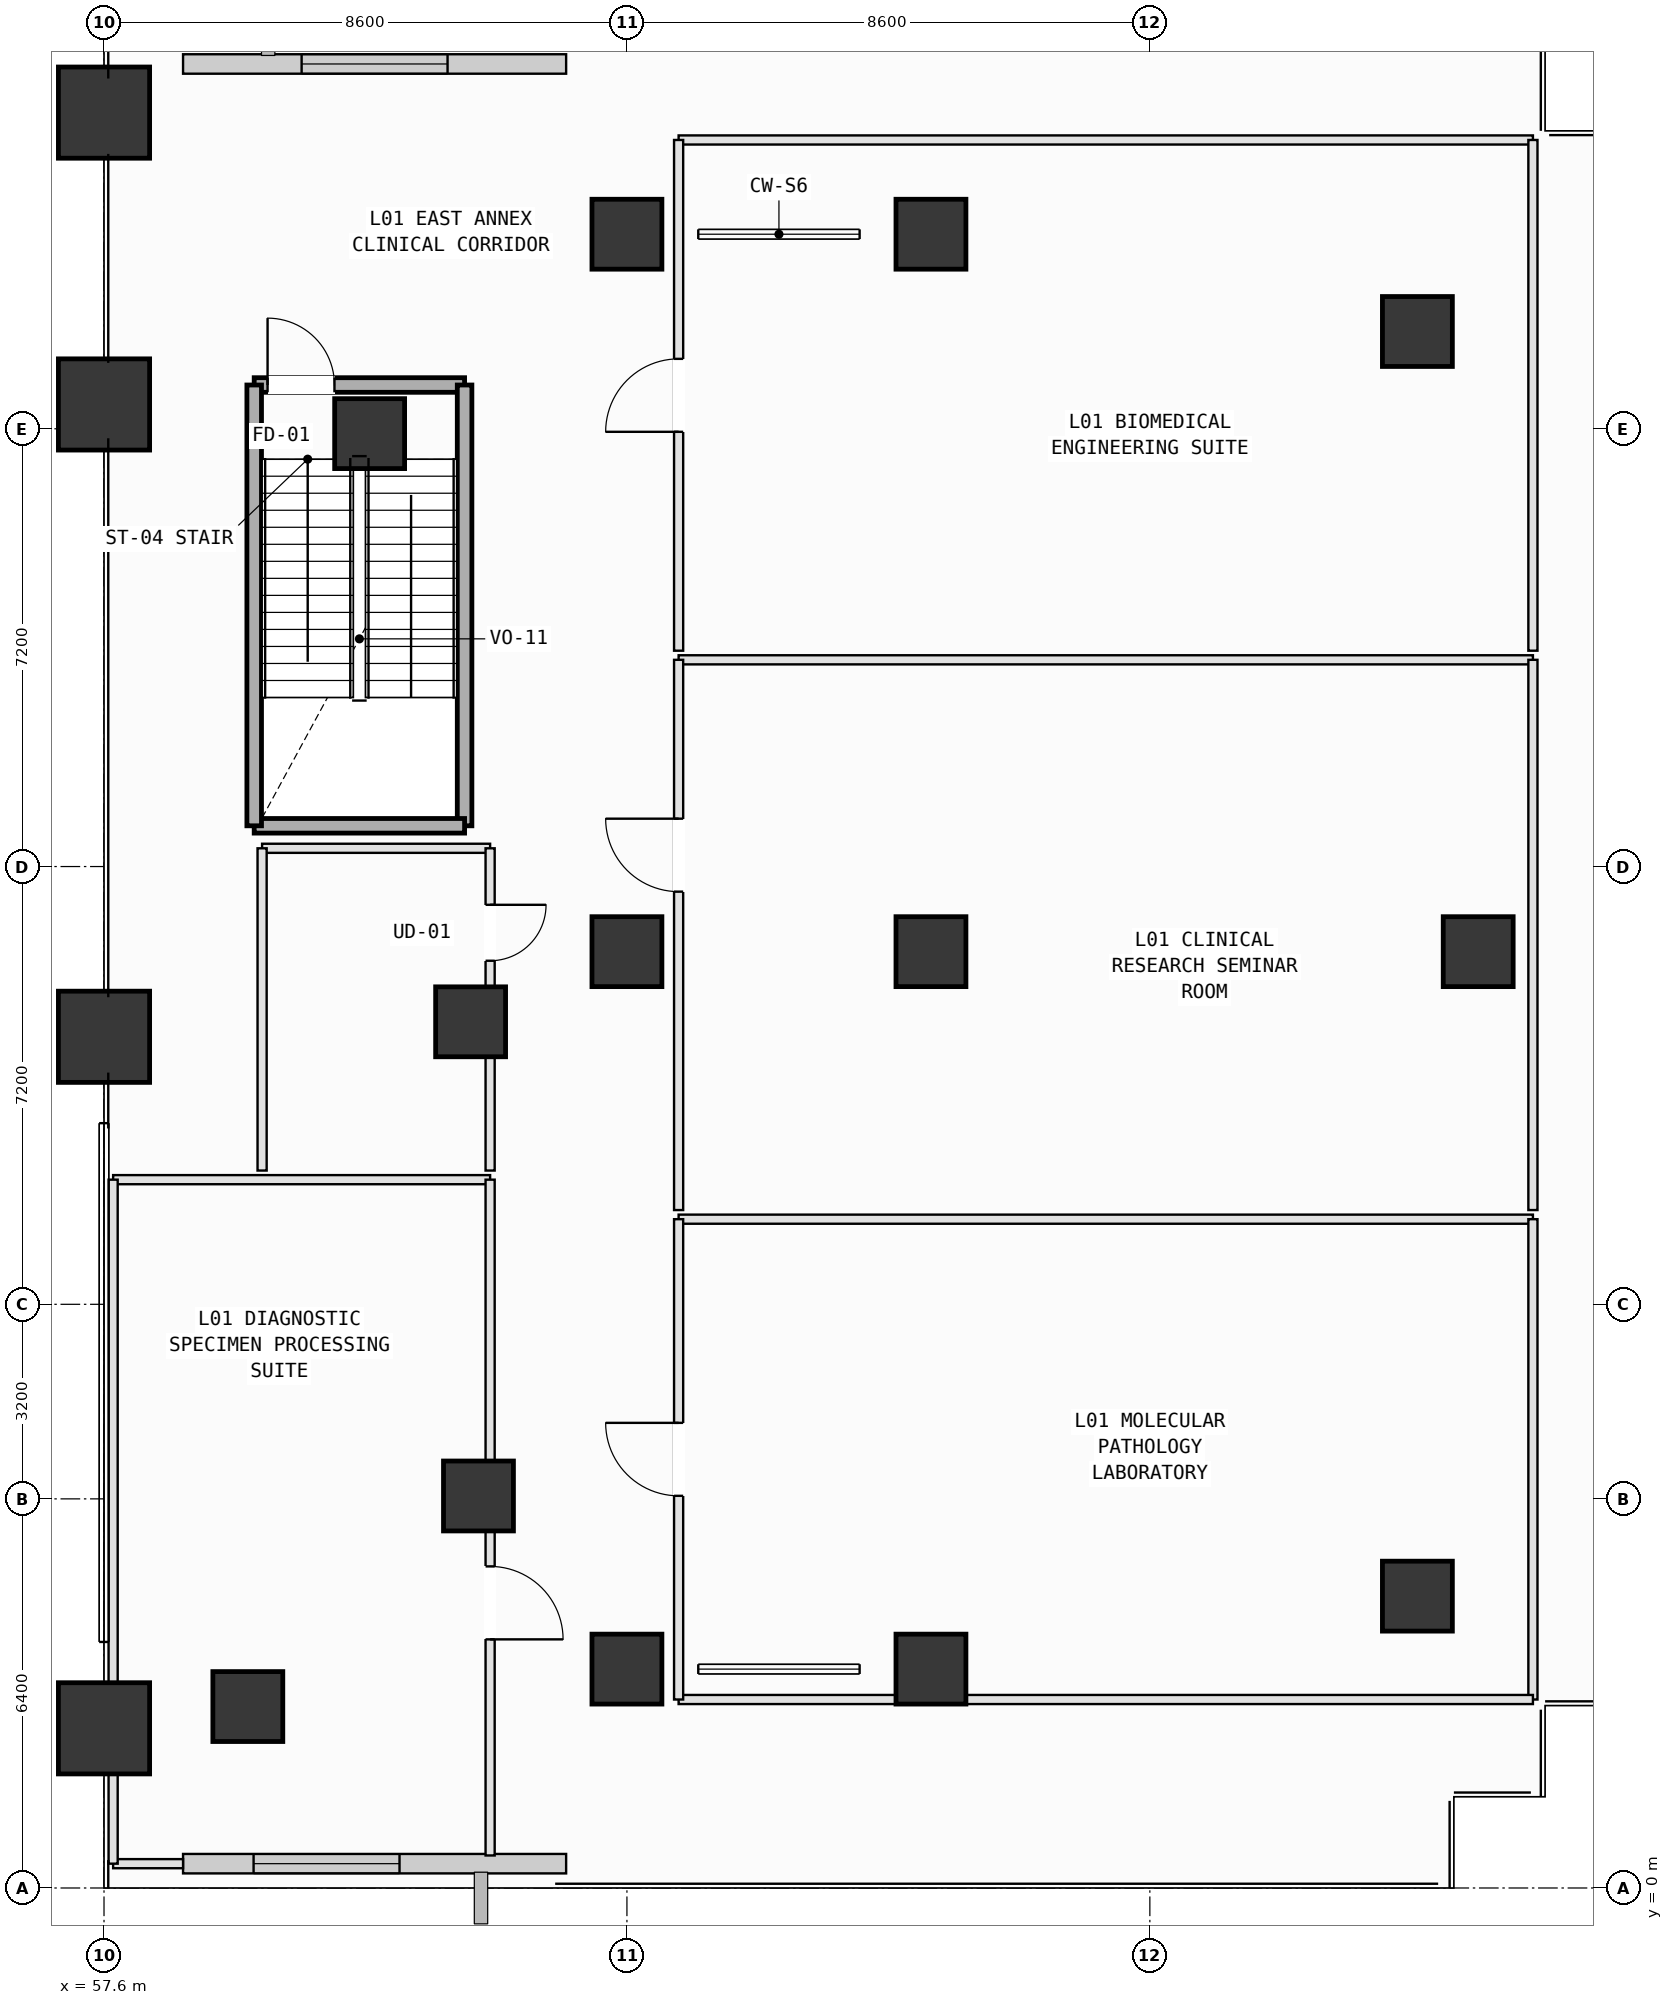
"""IFC4 building model, lengths in metres.
Left out: names, types, materials, properties, quantities, classifications, styles, units other than length and angle.
Written with IfcOpenShell. Run it as: python <this file> out.ifc"""

import sys

from ifc_helpers import new_model, si_unit, direction, frame, frame_2d, origin, origin_2d, place, context, subcontext, project, spatial, rectangle, extrude, element, fill, save


model = new_model("IFC4")
c1 = context("Model", 3, precision=1e-05, world=origin(), true_north=direction((0.0, 1.0)))
c2 = subcontext(c1, "Body", "Model", "MODEL_VIEW")
j1 = project(units=[si_unit("LENGTHUNIT", "METRE"), si_unit("PLANEANGLEUNIT", "RADIAN")], contexts=[c1])
p1 = place(None, origin())
s1 = spatial("IfcSite", under=j1, at=p1, CompositionType="ELEMENT")
p2 = place(p1, origin())
s2 = spatial("IfcBuilding", under=s1, at=p2, CompositionType="ELEMENT")
p3 = place(p2, frame((0.0, 0.0, 5.4)))
s3 = spatial("IfcBuildingStorey", under=s2, at=p3, CompositionType="ELEMENT", Elevation=5.4)
for number, where, z_axis, x_axis in (
    (1, (57.6, 2.626, 0.0), (0.0, 0.0, 1.0), (1.0, 0.0, 0.0)),
    (2, (57.6, 14.0, 0.0), (0.0, 0.0, 1.0), (1.0, 0.0, 0.0)),
    (3, (57.6, 24.4, 0.0), (0.0, 0.0, 1.0), (1.0, 0.0, 0.0)),
    (4, (57.6, 29.2, 0.0), (0.0, 0.0, 1.0), (1.0, 0.0, 0.0)),
):
    element("IfcColumn", number, at=place(p3, frame(where, z_axis=z_axis, x_axis=x_axis)), inside=s3, PredefinedType="PILASTER", context=c2, shape_type="SweptSolid", body=[
        extrude(rectangle(XDim=1.5, YDim=1.5, at=origin_2d()), origin(), (0.0, 0.0, 1.0), 5.4),
    ])
for number, where, z_axis, x_axis in (
    (5, (59.965, 2.984, 0.0), (0.0, 0.0, 1.0), (1.0, 0.0, 0.0)),
    (6, (63.758, 6.448, 0.0), (0.0, 0.0, 1.0), (1.0, 0.0, 0.0)),
    (7, (63.629, 14.246, 0.0), (0.0, 0.0, 1.0), (1.0, 0.0, 0.0)),
    (8, (61.969, 23.92, 0.0), (0.0, 0.0, 1.0), (1.0, 0.0, 0.0)),
    (9, (66.2, 3.6, 0.0), (0.0, 0.0, 1.0), (1.0, 0.0, 0.0)),
    (10, (71.2, 3.6, 0.0), (0.0, 0.0, 1.0), (1.0, 0.0, 0.0)),
    (11, (66.2, 15.4, 0.0), (0.0, 0.0, 1.0), (1.0, 0.0, 0.0)),
    (12, (71.2, 15.4, 0.0), (0.0, 0.0, 1.0), (1.0, 0.0, 0.0)),
    (13, (66.2, 27.2, 0.0), (0.0, 0.0, 1.0), (1.0, 0.0, 0.0)),
    (14, (71.2, 27.2, 0.0), (0.0, 0.0, 1.0), (1.0, 0.0, 0.0)),
    (15, (79.2, 4.8, 0.0), (0.0, 0.0, 1.0), (1.0, 0.0, 0.0)),
    (16, (80.2, 15.4, 0.0), (0.0, 0.0, 1.0), (1.0, 0.0, 0.0)),
    (17, (79.2, 25.6, 0.0), (0.0, 0.0, 1.0), (1.0, 0.0, 0.0)),
):
    element("IfcColumn", number, at=place(p3, frame(where, z_axis=z_axis, x_axis=x_axis)), inside=s3, PredefinedType="COLUMN", context=c2, shape_type="SweptSolid", body=[
        extrude(rectangle(XDim=1.15, YDim=1.15, at=origin_2d()), origin(), (0.0, 0.0, 1.0), 5.4),
    ])
p4 = place(p3, frame((65.2, 0.4, 0.0), z_axis=(0.0, 0.0, 1.0), x_axis=(-1.0, 0.0, 0.0)))
e18 = element("IfcWall", 18, at=p4, inside=s3, PredefinedType="SOLIDWALL", context=c2, shape_type="SweptSolid", body=[
    extrude(rectangle(XDim=6.3, YDim=0.32, at=frame_2d((3.15, 0.0))), origin(), (0.0, 0.0, 1.0), 4.23),
])
p5 = place(p4, frame((2.74, 0.0, 0.8)))
e19 = element("IfcOpeningElement", 19, at=p5, cuts=e18, PredefinedType="OPENING", context=c2, shape_type="SweptSolid", body=[
    extrude(rectangle(XDim=2.4, YDim=2.2, at=frame_2d((1.2, 1.1))), frame((0.0, 0.17, 0.0), z_axis=(0.0, -1.0, 0.0), x_axis=(1.0, 0.0, 0.0)), (0.0, 0.0, 1.0), 0.34),
])
p6 = place(p3, frame((58.9, 30.0, 0.0), z_axis=(0.0, 0.0, 1.0), x_axis=(1.0, 0.0, 0.0)))
e20 = element("IfcWall", 20, at=p6, inside=s3, PredefinedType="SOLIDWALL", context=c2, shape_type="SweptSolid", body=[
    extrude(rectangle(XDim=6.3, YDim=0.32, at=frame_2d((3.15, 0.0))), origin(), (0.0, 0.0, 1.0), 4.23),
])
p7 = place(p6, frame((1.95, 0.0, 0.8)))
e21 = element("IfcOpeningElement", 21, at=p7, cuts=e20, PredefinedType="OPENING", context=c2, shape_type="SweptSolid", body=[
    extrude(rectangle(XDim=2.4, YDim=2.2, at=frame_2d((1.2, 1.1))), frame((0.0, 0.17, 0.0), z_axis=(0.0, -1.0, 0.0), x_axis=(1.0, 0.0, 0.0)), (0.0, 0.0, 1.0), 0.34),
])
p8 = place(p3, frame((60.07, 24.72, 0.0), z_axis=(0.0, 0.0, 1.0), x_axis=(1.0, 0.0, 0.0)))
e22 = element("IfcWall", 22, at=p8, inside=s3, PredefinedType="SOLIDWALL", context=c2, shape_type="SweptSolid", body=[
    extrude(rectangle(XDim=3.46, YDim=0.24, at=frame_2d((1.73, 0.0))), origin(), (0.0, 0.0, 1.0), 5.15),
])
p9 = place(p8, frame((0.22, 0.0, 0.0)))
e23 = element("IfcOpeningElement", 23, at=p9, cuts=e22, PredefinedType="OPENING", context=c2, shape_type="SweptSolid", body=[
    extrude(rectangle(XDim=1.1, YDim=2.15, at=frame_2d((0.55, 1.075))), frame((0.0, 0.13, 0.0), z_axis=(0.0, -1.0, 0.0), x_axis=(1.0, 0.0, 0.0)), (0.0, 0.0, 1.0), 0.26),
])
p10 = place(p3, frame((63.53, 24.72, 0.0), z_axis=(0.0, 0.0, 1.0), x_axis=(0.0, -1.0, 0.0)))
e24 = element("IfcWall", 24, at=p10, inside=s3, PredefinedType="SOLIDWALL", context=c2, shape_type="SweptSolid", body=[
    extrude(rectangle(XDim=7.25, YDim=0.24, at=frame_2d((3.625, 0.0))), origin(), (0.0, 0.0, 1.0), 5.15),
])
p11 = place(p3, frame((63.53, 17.47, 0.0), z_axis=(0.0, 0.0, 1.0), x_axis=(-1.0, 0.0, 0.0)))
e25 = element("IfcWall", 25, at=p11, inside=s3, PredefinedType="SOLIDWALL", context=c2, shape_type="SweptSolid", body=[
    extrude(rectangle(XDim=3.46, YDim=0.24, at=frame_2d((1.73, 0.0))), origin(), (0.0, 0.0, 1.0), 5.15),
])
p12 = place(p3, frame((60.07, 17.47, 0.0), z_axis=(0.0, 0.0, 1.0), x_axis=(0.0, 1.0, 0.0)))
e26 = element("IfcWall", 26, at=p12, inside=s3, PredefinedType="SOLIDWALL", context=c2, shape_type="SweptSolid", body=[
    extrude(rectangle(XDim=7.25, YDim=0.24, at=frame_2d((3.625, 0.0))), origin(), (0.0, 0.0, 1.0), 5.15),
])
p13 = place(p3, frame((67.05, 11.0, 0.0), z_axis=(0.0, 0.0, 1.0), x_axis=(1.0, 0.0, 0.0)))
e27 = element("IfcWall", 27, at=p13, inside=s3, PredefinedType="PARTITIONING", context=c2, shape_type="SweptSolid", body=[
    extrude(rectangle(XDim=14.05, YDim=0.15, at=frame_2d((7.025, 0.0))), origin(), (0.0, 0.0, 1.0), 5.15),
])
p14 = place(p3, frame((81.1, 11.0, 0.0), z_axis=(0.0, 0.0, 1.0), x_axis=(0.0, -1.0, 0.0)))
e28 = element("IfcWall", 28, at=p14, inside=s3, PredefinedType="PARTITIONING", context=c2, shape_type="SweptSolid", body=[
    extrude(rectangle(XDim=7.9, YDim=0.15, at=frame_2d((3.95, 0.0))), origin(), (0.0, 0.0, 1.0), 5.15),
])
p15 = place(p3, frame((81.1, 3.1, 0.0), z_axis=(0.0, 0.0, 1.0), x_axis=(-1.0, 0.0, 0.0)))
e29 = element("IfcWall", 29, at=p15, inside=s3, PredefinedType="PARTITIONING", context=c2, shape_type="SweptSolid", body=[
    extrude(rectangle(XDim=14.05, YDim=0.15, at=frame_2d((7.025, 0.0))), origin(), (0.0, 0.0, 1.0), 4.235),
])
p16 = place(p3, frame((67.05, 3.1, 0.0), z_axis=(0.0, 0.0, 1.0), x_axis=(0.0, 1.0, 0.0)))
e30 = element("IfcWall", 30, at=p16, inside=s3, PredefinedType="PARTITIONING", context=c2, shape_type="SweptSolid", body=[
    extrude(rectangle(XDim=7.9, YDim=0.15, at=frame_2d((3.95, 0.0))), origin(), (0.0, 0.0, 1.0), 5.15),
])
p17 = place(p16, frame((3.35, 0.0, 0.0)))
e31 = element("IfcOpeningElement", 31, at=p17, cuts=e30, PredefinedType="OPENING", context=c2, shape_type="SweptSolid", body=[
    extrude(rectangle(XDim=1.2, YDim=2.15, at=frame_2d((0.6, 1.075))), frame((0.0, 0.085, 0.0), z_axis=(0.0, -1.0, 0.0), x_axis=(1.0, 0.0, 0.0)), (0.0, 0.0, 1.0), 0.17),
])
p18 = place(p3, frame((67.05, 20.2, 0.0), z_axis=(0.0, 0.0, 1.0), x_axis=(1.0, 0.0, 0.0)))
e32 = element("IfcWall", 32, at=p18, inside=s3, PredefinedType="PARTITIONING", context=c2, shape_type="SweptSolid", body=[
    extrude(rectangle(XDim=14.05, YDim=0.15, at=frame_2d((7.025, 0.0))), origin(), (0.0, 0.0, 1.0), 5.15),
])
p19 = place(p3, frame((81.1, 20.2, 0.0), z_axis=(0.0, 0.0, 1.0), x_axis=(0.0, -1.0, 0.0)))
e33 = element("IfcWall", 33, at=p19, inside=s3, PredefinedType="PARTITIONING", context=c2, shape_type="SweptSolid", body=[
    extrude(rectangle(XDim=9.05, YDim=0.15, at=frame_2d((4.525, 0.0))), origin(), (0.0, 0.0, 1.0), 5.15),
])
p20 = place(p3, frame((67.05, 11.15, 0.0), z_axis=(0.0, 0.0, 1.0), x_axis=(0.0, 1.0, 0.0)))
e34 = element("IfcWall", 34, at=p20, inside=s3, PredefinedType="PARTITIONING", context=c2, shape_type="SweptSolid", body=[
    extrude(rectangle(XDim=9.05, YDim=0.15, at=frame_2d((4.525, 0.0))), origin(), (0.0, 0.0, 1.0), 5.15),
])
p21 = place(p20, frame((5.237, 0.0, 0.0)))
e35 = element("IfcOpeningElement", 35, at=p21, cuts=e34, PredefinedType="OPENING", context=c2, shape_type="SweptSolid", body=[
    extrude(rectangle(XDim=1.2, YDim=2.15, at=frame_2d((0.6, 1.075))), frame((0.0, 0.085, 0.0), z_axis=(0.0, -1.0, 0.0), x_axis=(1.0, 0.0, 0.0)), (0.0, 0.0, 1.0), 0.17),
])
p22 = place(p3, frame((67.05, 28.75, 0.0), z_axis=(0.0, 0.0, 1.0), x_axis=(1.0, 0.0, 0.0)))
e36 = element("IfcWall", 36, at=p22, inside=s3, PredefinedType="PARTITIONING", context=c2, shape_type="SweptSolid", body=[
    extrude(rectangle(XDim=14.05, YDim=0.15, at=frame_2d((7.025, 0.0))), origin(), (0.0, 0.0, 1.0), 5.15),
])
p23 = place(p3, frame((81.1, 28.75, 0.0), z_axis=(0.0, 0.0, 1.0), x_axis=(0.0, -1.0, 0.0)))
e37 = element("IfcWall", 37, at=p23, inside=s3, PredefinedType="PARTITIONING", context=c2, shape_type="SweptSolid", body=[
    extrude(rectangle(XDim=8.4, YDim=0.15, at=frame_2d((4.2, 0.0))), origin(), (0.0, 0.0, 1.0), 5.15),
])
p24 = place(p3, frame((67.05, 20.35, 0.0), z_axis=(0.0, 0.0, 1.0), x_axis=(0.0, 1.0, 0.0)))
e38 = element("IfcWall", 38, at=p24, inside=s3, PredefinedType="PARTITIONING", context=c2, shape_type="SweptSolid", body=[
    extrude(rectangle(XDim=8.4, YDim=0.15, at=frame_2d((4.2, 0.0))), origin(), (0.0, 0.0, 1.0), 5.15),
])
p25 = place(p24, frame((3.6, 0.0, 0.0)))
e39 = element("IfcOpeningElement", 39, at=p25, cuts=e38, PredefinedType="OPENING", context=c2, shape_type="SweptSolid", body=[
    extrude(rectangle(XDim=1.2, YDim=2.15, at=frame_2d((0.6, 1.075))), frame((0.0, 0.085, 0.0), z_axis=(0.0, -1.0, 0.0), x_axis=(1.0, 0.0, 0.0)), (0.0, 0.0, 1.0), 0.17),
])
p26 = place(p3, frame((57.75, 11.65, 0.0), z_axis=(0.0, 0.0, 1.0), x_axis=(1.0, 0.0, 0.0)))
e40 = element("IfcWall", 40, at=p26, inside=s3, PredefinedType="PARTITIONING", context=c2, shape_type="SweptSolid", body=[
    extrude(rectangle(XDim=6.2, YDim=0.15, at=frame_2d((3.1, 0.0))), origin(), (0.0, 0.0, 1.0), 5.15),
])
p27 = place(p3, frame((63.95, 11.65, 0.0), z_axis=(0.0, 0.0, 1.0), x_axis=(0.0, -1.0, 0.0)))
e41 = element("IfcWall", 41, at=p27, inside=s3, PredefinedType="PARTITIONING", context=c2, shape_type="SweptSolid", body=[
    extrude(rectangle(XDim=11.115, YDim=0.15, at=frame_2d((5.558, 0.0))), origin(), (0.0, 0.0, 1.0), 4.235),
])
p28 = place(p27, frame((6.361, 0.0, 0.0)))
e42 = element("IfcOpeningElement", 42, at=p28, cuts=e41, PredefinedType="OPENING", context=c2, shape_type="SweptSolid", body=[
    extrude(rectangle(XDim=1.2, YDim=2.15, at=frame_2d((0.6, 1.075))), frame((0.0, 0.085, 0.0), z_axis=(0.0, -1.0, 0.0), x_axis=(1.0, 0.0, 0.0)), (0.0, 0.0, 1.0), 0.17),
])
p29 = place(p3, frame((58.9, 0.4, 0.0), z_axis=(0.0, 0.0, 1.0), x_axis=(-1.0, 0.0, 0.0)))
e43 = element("IfcWall", 43, at=p29, inside=s3, PredefinedType="PARTITIONING", context=c2, shape_type="SweptSolid", body=[
    extrude(rectangle(XDim=1.15, YDim=0.15, at=frame_2d((0.575, 0.0))), origin(), (0.0, 0.0, 1.0), 5.15),
])
p30 = place(p3, frame((57.75, 0.4, 0.0), z_axis=(0.0, 0.0, 1.0), x_axis=(0.0, 1.0, 0.0)))
e44 = element("IfcWall", 44, at=p30, inside=s3, PredefinedType="PARTITIONING", context=c2, shape_type="SweptSolid", body=[
    extrude(rectangle(XDim=11.25, YDim=0.15, at=frame_2d((5.625, 0.0))), origin(), (0.0, 0.0, 1.0), 4.235),
])
p31 = place(p3, frame((60.2, 17.1, 0.0), z_axis=(0.0, 0.0, 1.0), x_axis=(1.0, 0.0, 0.0)))
e45 = element("IfcWall", 45, at=p31, inside=s3, PredefinedType="PARTITIONING", context=c2, shape_type="SweptSolid", body=[
    extrude(rectangle(XDim=3.75, YDim=0.15, at=frame_2d((1.875, 0.0))), origin(), (0.0, 0.0, 1.0), 5.15),
])
p32 = place(p3, frame((63.95, 17.1, 0.0), z_axis=(0.0, 0.0, 1.0), x_axis=(0.0, -1.0, 0.0)))
e46 = element("IfcWall", 46, at=p32, inside=s3, PredefinedType="PARTITIONING", context=c2, shape_type="SweptSolid", body=[
    extrude(rectangle(XDim=5.3, YDim=0.15, at=frame_2d((2.65, 0.0))), origin(), (0.0, 0.0, 1.0), 4.235),
])
p33 = place(p32, frame((0.929, 0.0, 0.0)))
e47 = element("IfcOpeningElement", 47, at=p33, cuts=e46, PredefinedType="OPENING", context=c2, shape_type="SweptSolid", body=[
    extrude(rectangle(XDim=0.92, YDim=2.1, at=frame_2d((0.46, 1.05))), frame((0.0, 0.085, 0.0), z_axis=(0.0, -1.0, 0.0), x_axis=(1.0, 0.0, 0.0)), (0.0, 0.0, 1.0), 0.17),
])
p34 = place(p3, frame((60.2, 11.8, 0.0), z_axis=(0.0, 0.0, 1.0), x_axis=(0.0, 1.0, 0.0)))
e48 = element("IfcWall", 48, at=p34, inside=s3, PredefinedType="PARTITIONING", context=c2, shape_type="SweptSolid", body=[
    extrude(rectangle(XDim=5.3, YDim=0.15, at=frame_2d((2.65, 0.0))), origin(), (0.0, 0.0, 1.0), 5.15),
])
p35 = place(p5, origin())
e49 = element("IfcWindow", 49, at=p35, inside=s3, PartitioningType="SINGLE_PANEL", PredefinedType="WINDOW", context=c2, shape_type="SweptSolid", body=[
    extrude(rectangle(XDim=2.4, YDim=2.2, at=frame_2d((1.2, 1.1))), frame((0.0, 0.03, 0.0), z_axis=(0.0, -1.0, 0.0), x_axis=(1.0, 0.0, 0.0)), (0.0, 0.0, 1.0), 0.06),
])
fill(e19, e49)
p36 = place(p7, origin())
e50 = element("IfcWindow", 50, at=p36, inside=s3, PartitioningType="SINGLE_PANEL", PredefinedType="WINDOW", context=c2, shape_type="SweptSolid", body=[
    extrude(rectangle(XDim=2.4, YDim=2.2, at=frame_2d((1.2, 1.1))), frame((0.0, 0.03, 0.0), z_axis=(0.0, -1.0, 0.0), x_axis=(1.0, 0.0, 0.0)), (0.0, 0.0, 1.0), 0.06),
])
fill(e21, e50)
p37 = place(p9, origin())
e51 = element("IfcDoor", 51, at=p37, inside=s3, OperationType="SINGLE_SWING_LEFT", PredefinedType="DOOR", context=c2, shape_type="SweptSolid", body=[
    extrude(rectangle(XDim=1.1, YDim=2.15, at=frame_2d((0.55, 1.075))), frame((0.0, 0.025, 0.0), z_axis=(0.0, -1.0, 0.0), x_axis=(1.0, 0.0, 0.0)), (0.0, 0.0, 1.0), 0.05),
])
fill(e23, e51)
p38 = place(p17, origin())
e52 = element("IfcDoor", 52, at=p38, inside=s3, OperationType="SINGLE_SWING_RIGHT", PredefinedType="DOOR", context=c2, shape_type="SweptSolid", body=[
    extrude(rectangle(XDim=1.2, YDim=2.15, at=frame_2d((0.6, 1.075))), frame((0.0, 0.025, 0.0), z_axis=(0.0, -1.0, 0.0), x_axis=(1.0, 0.0, 0.0)), (0.0, 0.0, 1.0), 0.05),
])
fill(e31, e52)
p39 = place(p21, origin())
e53 = element("IfcDoor", 53, at=p39, inside=s3, OperationType="SINGLE_SWING_RIGHT", PredefinedType="DOOR", context=c2, shape_type="SweptSolid", body=[
    extrude(rectangle(XDim=1.2, YDim=2.15, at=frame_2d((0.6, 1.075))), frame((0.0, 0.025, 0.0), z_axis=(0.0, -1.0, 0.0), x_axis=(1.0, 0.0, 0.0)), (0.0, 0.0, 1.0), 0.05),
])
fill(e35, e53)
p40 = place(p25, origin())
e54 = element("IfcDoor", 54, at=p40, inside=s3, OperationType="SINGLE_SWING_LEFT", PredefinedType="DOOR", context=c2, shape_type="SweptSolid", body=[
    extrude(rectangle(XDim=1.2, YDim=2.15, at=frame_2d((0.6, 1.075))), frame((0.0, 0.025, 0.0), z_axis=(0.0, -1.0, 0.0), x_axis=(1.0, 0.0, 0.0)), (0.0, 0.0, 1.0), 0.05),
])
fill(e39, e54)
p41 = place(p28, origin())
e55 = element("IfcDoor", 55, at=p41, inside=s3, OperationType="SINGLE_SWING_RIGHT", PredefinedType="DOOR", context=c2, shape_type="SweptSolid", body=[
    extrude(rectangle(XDim=1.2, YDim=2.15, at=frame_2d((0.6, 1.075))), frame((0.0, 0.025, 0.0), z_axis=(0.0, -1.0, 0.0), x_axis=(1.0, 0.0, 0.0)), (0.0, 0.0, 1.0), 0.05),
])
fill(e42, e55)
p42 = place(p33, origin())
e56 = element("IfcDoor", 56, at=p42, inside=s3, OperationType="SINGLE_SWING_LEFT", PredefinedType="DOOR", context=c2, shape_type="SweptSolid", body=[
    extrude(rectangle(XDim=0.92, YDim=2.1, at=frame_2d((0.46, 1.05))), frame((0.0, 0.025, 0.0), z_axis=(0.0, -1.0, 0.0), x_axis=(1.0, 0.0, 0.0)), (0.0, 0.0, 1.0), 0.05),
])
fill(e47, e56)
save(model, sys.argv[1])
